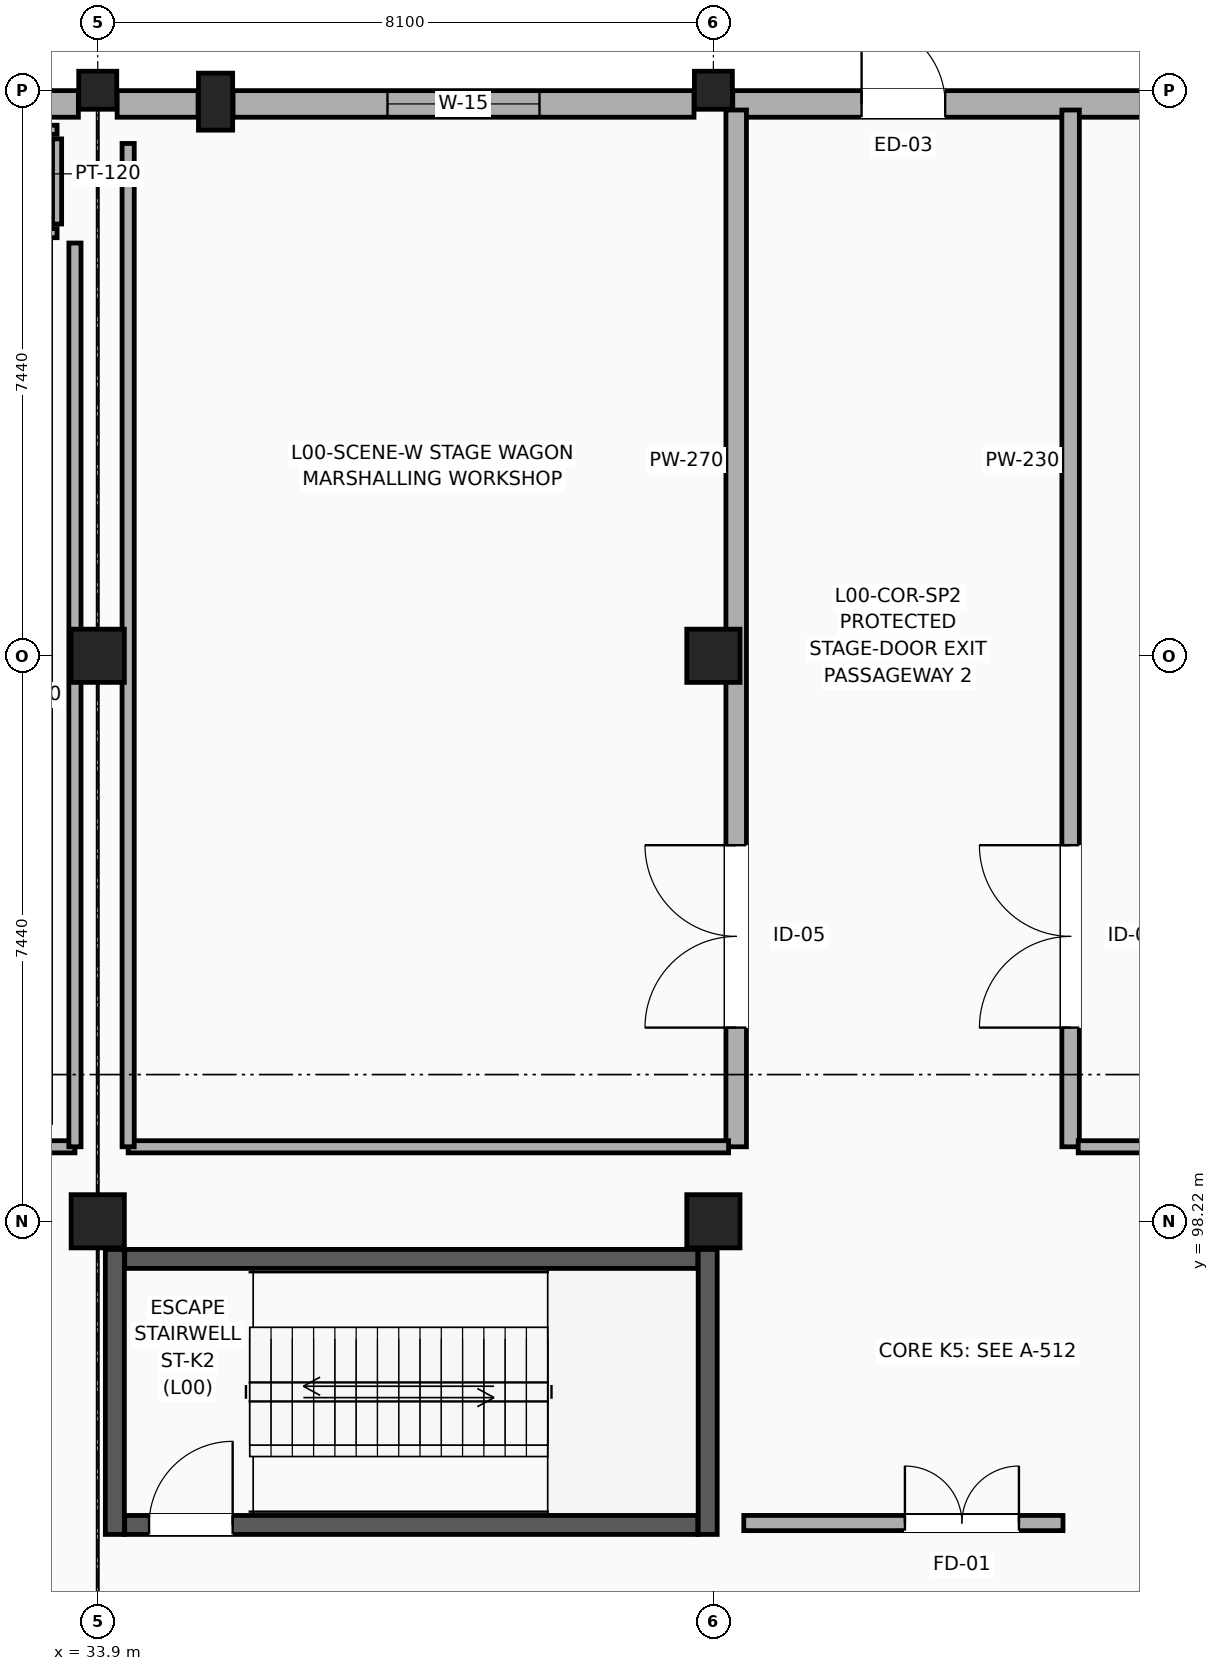
"""IFC4 building model, lengths in metres.
Left out: names, types, materials, properties, quantities, classifications, styles, units other than length and angle.
Written with IfcOpenShell. Run it as: python <this file> out.ifc"""

import sys

from ifc_helpers import new_model, si_unit, direction, frame, frame_2d, origin, origin_2d, place, context, subcontext, project, spatial, rectangle, extrude, element, fill, save


model = new_model("IFC4")
c1 = context("Model", 3, precision=1e-05, world=origin(), true_north=direction((0.0, 1.0)))
c2 = subcontext(c1, "Body", "Model", "MODEL_VIEW")
j1 = project(units=[si_unit("LENGTHUNIT", "METRE"), si_unit("PLANEANGLEUNIT", "RADIAN")], contexts=[c1])
p1 = place(None, origin())
s1 = spatial("IfcSite", under=j1, at=p1, CompositionType="ELEMENT")
p2 = place(p1, origin())
s2 = spatial("IfcBuilding", under=s1, at=p2, CompositionType="ELEMENT")
p3 = place(p2, origin())
s3 = spatial("IfcBuildingStorey", under=s2, at=p3, CompositionType="ELEMENT", Elevation=0.0)
p4 = place(p3, frame((35.45, 112.95, 0.0), z_axis=(0.0, 0.0, 1.0), x_axis=(1.0, 0.0, 0.0)))
e1 = element("IfcColumn", 1, at=p4, inside=s3, PredefinedType="PILASTER", context=c2, shape_type="SweptSolid", body=[
    extrude(rectangle(XDim=0.45, YDim=0.75, at=origin_2d()), origin(), (0.0, 0.0, 1.0), 5.4),
])
for number, where, z_axis, x_axis in (
    (2, (33.9, 98.22, 0.0), (0.0, 0.0, 1.0), (1.0, 0.0, 0.0)),
    (3, (33.9, 105.66, 0.0), (0.0, 0.0, 1.0), (1.0, 0.0, 0.0)),
):
    element("IfcColumn", number, at=place(p3, frame(where, z_axis=z_axis, x_axis=x_axis)), inside=s3, PredefinedType="COLUMN", context=c2, shape_type="SweptSolid", body=[
        extrude(rectangle(XDim=0.7, YDim=0.7, at=origin_2d()), origin(), (0.0, 0.0, 1.0), 5.4),
    ])
p5 = place(p3, frame((33.9, 113.1, 0.0), z_axis=(0.0, 0.0, 1.0), x_axis=(1.0, 0.0, 0.0)))
e4 = element("IfcColumn", 4, at=p5, inside=s3, PredefinedType="COLUMN", context=c2, shape_type="SweptSolid", body=[
    extrude(rectangle(XDim=0.5, YDim=0.5, at=origin_2d()), origin(), (0.0, 0.0, 1.0), 5.4),
])
for number, where, z_axis, x_axis in (
    (5, (42.0, 98.22, 0.0), (0.0, 0.0, 1.0), (1.0, 0.0, 0.0)),
    (6, (42.0, 105.66, 0.0), (0.0, 0.0, 1.0), (1.0, 0.0, 0.0)),
):
    element("IfcColumn", number, at=place(p3, frame(where, z_axis=z_axis, x_axis=x_axis)), inside=s3, PredefinedType="COLUMN", context=c2, shape_type="SweptSolid", body=[
        extrude(rectangle(XDim=0.7, YDim=0.7, at=origin_2d()), origin(), (0.0, 0.0, 1.0), 5.4),
    ])
p6 = place(p3, frame((42.0, 113.1, 0.0), z_axis=(0.0, 0.0, 1.0), x_axis=(1.0, 0.0, 0.0)))
e7 = element("IfcColumn", 7, at=p6, inside=s3, PredefinedType="COLUMN", context=c2, shape_type="SweptSolid", body=[
    extrude(rectangle(XDim=0.5, YDim=0.5, at=origin_2d()), origin(), (0.0, 0.0, 1.0), 5.4),
])
p7 = place(p3, frame((27.555, 112.92, 0.0), z_axis=(0.0, 0.0, 1.0), x_axis=(1.0, 0.0, 0.0)))
e8 = element("IfcWall", 8, at=p7, inside=s3, PredefinedType="SOLIDWALL", context=c2, shape_type="SweptSolid", body=[
    extrude(rectangle(XDim=6.09, YDim=0.35, at=frame_2d((3.045, 0.0))), origin(), (0.0, 0.0, 1.0), 4.137),
])
p8 = place(p7, frame((2.595, 0.0, 0.9)))
e9 = element("IfcOpeningElement", 9, at=p8, cuts=e8, PredefinedType="OPENING", context=c2, shape_type="SweptSolid", body=[
    extrude(rectangle(XDim=0.9, YDim=2.1, at=frame_2d((0.45, 1.05))), frame((0.0, 0.185, 0.0), z_axis=(0.0, -1.0, 0.0), x_axis=(1.0, 0.0, 0.0)), (0.0, 0.0, 1.0), 0.37),
])
p9 = place(p3, frame((35.68, 112.92, 0.0), z_axis=(0.0, 0.0, 1.0), x_axis=(1.0, 0.0, 0.0)))
e10 = element("IfcWall", 10, at=p9, inside=s3, PredefinedType="SOLIDWALL", context=c2, shape_type="SweptSolid", body=[
    extrude(rectangle(XDim=6.065, YDim=0.35, at=frame_2d((3.033, 0.0))), origin(), (0.0, 0.0, 1.0), 4.137),
])
p10 = place(p9, frame((2.032, 0.0, 0.9)))
e11 = element("IfcOpeningElement", 11, at=p10, cuts=e10, PredefinedType="OPENING", context=c2, shape_type="SweptSolid", body=[
    extrude(rectangle(XDim=2.0, YDim=1.65, at=frame_2d((1.0, 0.825))), frame((0.0, 0.185, 0.0), z_axis=(0.0, -1.0, 0.0), x_axis=(1.0, 0.0, 0.0)), (0.0, 0.0, 1.0), 0.37),
])
p11 = place(p3, frame((34.155, 112.92, 0.0), z_axis=(0.0, 0.0, 1.0), x_axis=(1.0, 0.0, 0.0)))
e12 = element("IfcWall", 12, at=p11, inside=s3, PredefinedType="SOLIDWALL", context=c2, shape_type="SweptSolid", body=[
    extrude(rectangle(XDim=1.065, YDim=0.35, at=frame_2d((0.532, 0.0))), origin(), (0.0, 0.0, 1.0), 4.137),
])
p12 = place(p3, frame((42.255, 112.92, 0.0), z_axis=(0.0, 0.0, 1.0), x_axis=(1.0, 0.0, 0.0)))
e13 = element("IfcWall", 13, at=p12, inside=s3, PredefinedType="SOLIDWALL", context=c2, shape_type="SweptSolid", body=[
    extrude(rectangle(XDim=7.59, YDim=0.35, at=frame_2d((3.795, 0.0))), origin(), (0.0, 0.0, 1.0), 4.137),
])
p13 = place(p12, frame((1.695, 0.0, 0.0)))
e14 = element("IfcOpeningElement", 14, at=p13, cuts=e13, PredefinedType="OPENING", context=c2, shape_type="SweptSolid", body=[
    extrude(rectangle(XDim=1.1, YDim=2.2, at=frame_2d((0.55, 1.1))), frame((0.0, 0.185, 0.0), z_axis=(0.0, -1.0, 0.0), x_axis=(1.0, 0.0, 0.0)), (0.0, 0.0, 1.0), 0.37),
])
p14 = place(p3, frame((34.255, 94.225, 0.0), z_axis=(0.0, 0.0, 1.0), x_axis=(1.0, 0.0, 0.0)))
e15 = element("IfcWall", 15, at=p14, inside=s3, PredefinedType="SHEAR", context=c2, shape_type="SweptSolid", body=[
    extrude(rectangle(XDim=7.54, YDim=0.25, at=frame_2d((3.77, 0.0))), origin(), (0.0, 0.0, 1.0), 5.105),
])
p15 = place(p14, frame((0.32, 0.0, 0.0)))
e16 = element("IfcOpeningElement", 16, at=p15, cuts=e15, PredefinedType="OPENING", context=c2, shape_type="SweptSolid", body=[
    extrude(rectangle(XDim=1.1, YDim=2.2, at=frame_2d((0.55, 1.1))), frame((0.0, 0.135, 0.0), z_axis=(0.0, -1.0, 0.0), x_axis=(1.0, 0.0, 0.0)), (0.0, 0.0, 1.0), 0.27),
])
p16 = place(p3, frame((34.255, 97.725, 0.0), z_axis=(0.0, 0.0, 1.0), x_axis=(1.0, 0.0, 0.0)))
e17 = element("IfcWall", 17, at=p16, inside=s3, PredefinedType="SHEAR", context=c2, shape_type="SweptSolid", body=[
    extrude(rectangle(XDim=7.54, YDim=0.25, at=frame_2d((3.77, 0.0))), origin(), (0.0, 0.0, 1.0), 5.105),
])
for number, where, z_axis, x_axis in (
    (18, (34.125, 94.1, 0.0), (0.0, 0.0, 1.0), (0.0, 1.0, 0.0)),
    (19, (41.925, 94.1, 0.0), (0.0, 0.0, 1.0), (0.0, 1.0, 0.0)),
):
    element("IfcWall", number, at=place(p3, frame(where, z_axis=z_axis, x_axis=x_axis)), inside=s3, PredefinedType="SHEAR", context=c2, shape_type="SweptSolid", body=[
        extrude(rectangle(XDim=3.75, YDim=0.25, at=frame_2d((1.875, 0.0))), origin(), (0.0, 0.0, 1.0), 5.105),
    ])
for number, where, z_axis, x_axis in (
    (20, (32.005, 111.22, 0.0), (0.0, 0.0, 1.0), (1.0, 0.0, 0.0)),
    (21, (32.005, 112.58, 0.0), (0.0, 0.0, 1.0), (1.0, 0.0, 0.0)),
):
    element("IfcWall", number, at=place(p3, frame(where, z_axis=z_axis, x_axis=x_axis)), inside=s3, PredefinedType="PARTITIONING", context=c2, shape_type="SweptSolid", body=[
        extrude(rectangle(XDim=1.36, YDim=0.12, at=frame_2d((0.68, 0.0))), origin(), (0.0, 0.0, 1.0), 5.085),
    ])
p17 = place(p3, frame((33.365, 111.34, 0.0), z_axis=(0.0, 0.0, 1.0), x_axis=(0.0, 1.0, 0.0)))
e22 = element("IfcWall", 22, at=p17, inside=s3, PredefinedType="PARTITIONING", context=c2, shape_type="SweptSolid", body=[
    extrude(rectangle(XDim=1.12, YDim=0.12, at=frame_2d((0.56, 0.0))), origin(), (0.0, 0.0, 1.0), 5.085),
])
p18 = place(p3, frame((42.4, 94.25, 0.0), z_axis=(0.0, 0.0, 1.0), x_axis=(1.0, 0.0, 0.0)))
e23 = element("IfcWall", 23, at=p18, inside=s3, PredefinedType="PARTITIONING", context=c2, shape_type="SweptSolid", body=[
    extrude(rectangle(XDim=4.2, YDim=0.2, at=frame_2d((2.1, 0.0))), origin(), (0.0, 0.0, 1.0), 4.757),
])
p19 = place(p18, frame((2.12, 0.0, 0.0)))
e24 = element("IfcOpeningElement", 24, at=p19, cuts=e23, PredefinedType="OPENING", context=c2, shape_type="SweptSolid", body=[
    extrude(rectangle(XDim=1.5, YDim=2.2, at=frame_2d((0.75, 1.1))), frame((0.0, 0.11, 0.0), z_axis=(0.0, -1.0, 0.0), x_axis=(1.0, 0.0, 0.0)), (0.0, 0.0, 1.0), 0.22),
])
p20 = place(p3, frame((42.3, 99.2, 0.0), z_axis=(0.0, 0.0, 1.0), x_axis=(0.0, 1.0, 0.0)))
e25 = element("IfcWall", 25, at=p20, inside=s3, PredefinedType="SOLIDWALL", context=c2, shape_type="SweptSolid", body=[
    extrude(rectangle(XDim=13.64, YDim=0.27, at=frame_2d((6.82, 0.0))), origin(), (0.0, 0.0, 1.0), 4.137),
])
p21 = place(p20, frame((1.568, 0.0, 0.0)))
e26 = element("IfcOpeningElement", 26, at=p21, cuts=e25, PredefinedType="OPENING", context=c2, shape_type="SweptSolid", body=[
    extrude(rectangle(XDim=2.4, YDim=2.8, at=frame_2d((1.2, 1.4))), frame((0.0, 0.145, 0.0), z_axis=(0.0, -1.0, 0.0), x_axis=(1.0, 0.0, 0.0)), (0.0, 0.0, 1.0), 0.29),
])
p22 = place(p3, frame((46.7, 99.2, 0.0), z_axis=(0.0, 0.0, 1.0), x_axis=(0.0, 1.0, 0.0)))
e27 = element("IfcWall", 27, at=p22, inside=s3, PredefinedType="SOLIDWALL", context=c2, shape_type="SweptSolid", body=[
    extrude(rectangle(XDim=13.64, YDim=0.23, at=frame_2d((6.82, 0.0))), origin(), (0.0, 0.0, 1.0), 4.137),
])
p23 = place(p22, frame((1.568, 0.0, 0.0)))
e28 = element("IfcOpeningElement", 28, at=p23, cuts=e27, PredefinedType="OPENING", context=c2, shape_type="SweptSolid", body=[
    extrude(rectangle(XDim=2.4, YDim=2.8, at=frame_2d((1.2, 1.4))), frame((0.0, 0.125, 0.0), z_axis=(0.0, -1.0, 0.0), x_axis=(1.0, 0.0, 0.0)), (0.0, 0.0, 1.0), 0.25),
])
p24 = place(p3, frame((22.4, 99.2, 0.0), z_axis=(0.0, 0.0, 1.0), x_axis=(1.0, 0.0, 0.0)))
e29 = element("IfcWall", 29, at=p24, inside=s3, PredefinedType="PARTITIONING", context=c2, shape_type="SweptSolid", body=[
    extrude(rectangle(XDim=11.2, YDim=0.16, at=frame_2d((5.6, 0.0))), origin(), (0.0, 0.0, 1.0), 4.337),
])
p25 = place(p3, frame((33.6, 99.2, 0.0), z_axis=(0.0, 0.0, 1.0), x_axis=(0.0, 1.0, 0.0)))
e30 = element("IfcWall", 30, at=p25, inside=s3, PredefinedType="PARTITIONING", context=c2, shape_type="SweptSolid", body=[
    extrude(rectangle(XDim=11.89, YDim=0.16, at=frame_2d((5.945, 0.0))), origin(), (0.0, 0.0, 1.0), 4.137),
])
p26 = place(p3, frame((34.3, 99.2, 0.0), z_axis=(0.0, 0.0, 1.0), x_axis=(1.0, 0.0, 0.0)))
e31 = element("IfcWall", 31, at=p26, inside=s3, PredefinedType="PARTITIONING", context=c2, shape_type="SweptSolid", body=[
    extrude(rectangle(XDim=7.9, YDim=0.16, at=frame_2d((3.95, 0.0))), origin(), (0.0, 0.0, 1.0), 4.337),
])
p27 = place(p3, frame((34.3, 99.2, 0.0), z_axis=(0.0, 0.0, 1.0), x_axis=(0.0, 1.0, 0.0)))
e32 = element("IfcWall", 32, at=p27, inside=s3, PredefinedType="PARTITIONING", context=c2, shape_type="SweptSolid", body=[
    extrude(rectangle(XDim=13.2, YDim=0.16, at=frame_2d((6.6, 0.0))), origin(), (0.0, 0.0, 1.0), 4.137),
])
p28 = place(p3, frame((46.8, 99.2, 0.0), z_axis=(0.0, 0.0, 1.0), x_axis=(1.0, 0.0, 0.0)))
e33 = element("IfcWall", 33, at=p28, inside=s3, PredefinedType="PARTITIONING", context=c2, shape_type="SweptSolid", body=[
    extrude(rectangle(XDim=19.0, YDim=0.16, at=frame_2d((9.5, 0.0))), origin(), (0.0, 0.0, 1.0), 4.337),
])
p29 = place(p10, origin())
e34 = element("IfcWindow", 34, at=p29, inside=s3, PartitioningType="SINGLE_PANEL", PredefinedType="WINDOW", context=c2, shape_type="SweptSolid", body=[
    extrude(rectangle(XDim=2.0, YDim=1.65, at=frame_2d((1.0, 0.825))), frame((0.0, 0.03, 0.0), z_axis=(0.0, -1.0, 0.0), x_axis=(1.0, 0.0, 0.0)), (0.0, 0.0, 1.0), 0.06),
])
fill(e11, e34)
p30 = place(p13, origin())
e35 = element("IfcDoor", 35, at=p30, inside=s3, OperationType="SINGLE_SWING_LEFT", PredefinedType="DOOR", context=c2, shape_type="SweptSolid", body=[
    extrude(rectangle(XDim=1.1, YDim=2.2, at=frame_2d((0.55, 1.1))), frame((0.0, 0.025, 0.0), z_axis=(0.0, -1.0, 0.0), x_axis=(1.0, 0.0, 0.0)), (0.0, 0.0, 1.0), 0.05),
])
fill(e14, e35)
p31 = place(p15, origin())
e36 = element("IfcDoor", 36, at=p31, inside=s3, OperationType="SINGLE_SWING_RIGHT", PredefinedType="DOOR", context=c2, shape_type="SweptSolid", body=[
    extrude(rectangle(XDim=1.1, YDim=2.2, at=frame_2d((0.55, 1.1))), frame((0.0, 0.025, 0.0), z_axis=(0.0, -1.0, 0.0), x_axis=(1.0, 0.0, 0.0)), (0.0, 0.0, 1.0), 0.05),
])
fill(e16, e36)
p32 = place(p19, origin())
e37 = element("IfcDoor", 37, at=p32, inside=s3, OperationType="DOUBLE_DOOR_SINGLE_SWING", PredefinedType="DOOR", context=c2, shape_type="SweptSolid", body=[
    extrude(rectangle(XDim=1.5, YDim=2.2, at=frame_2d((0.75, 1.1))), frame((0.0, 0.025, 0.0), z_axis=(0.0, -1.0, 0.0), x_axis=(1.0, 0.0, 0.0)), (0.0, 0.0, 1.0), 0.05),
])
fill(e24, e37)
p33 = place(p21, origin())
e38 = element("IfcDoor", 38, at=p33, inside=s3, OperationType="DOUBLE_DOOR_SINGLE_SWING", PredefinedType="DOOR", context=c2, shape_type="SweptSolid", body=[
    extrude(rectangle(XDim=2.4, YDim=2.8, at=frame_2d((1.2, 1.4))), frame((0.0, 0.025, 0.0), z_axis=(0.0, -1.0, 0.0), x_axis=(1.0, 0.0, 0.0)), (0.0, 0.0, 1.0), 0.05),
])
fill(e26, e38)
p34 = place(p23, origin())
e39 = element("IfcDoor", 39, at=p34, inside=s3, OperationType="DOUBLE_DOOR_SINGLE_SWING", PredefinedType="DOOR", context=c2, shape_type="SweptSolid", body=[
    extrude(rectangle(XDim=2.4, YDim=2.8, at=frame_2d((1.2, 1.4))), frame((0.0, 0.025, 0.0), z_axis=(0.0, -1.0, 0.0), x_axis=(1.0, 0.0, 0.0)), (0.0, 0.0, 1.0), 0.05),
])
fill(e28, e39)
save(model, sys.argv[1])
